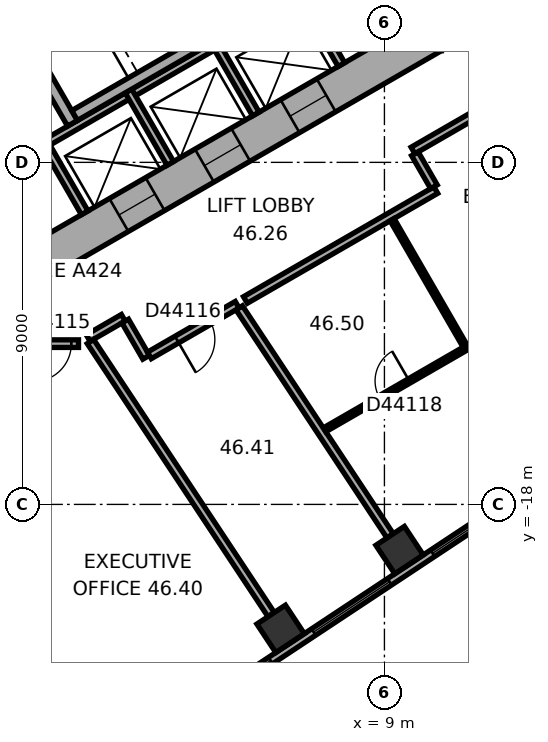
"""IFC4 building model, lengths in metres.
Left out: names, types, materials, properties, quantities, classifications, styles, units other than length and angle.
Written with IfcOpenShell. Run it as: python <this file> out.ifc"""

import sys

from ifc_helpers import new_model, si_unit, direction, frame, frame_2d, origin, origin_2d, place, context, subcontext, project, spatial, rectangle, extrude, element, fill, save


model = new_model("IFC4")
c1 = context("Model", 3, precision=1e-05, world=origin(), true_north=direction((0.0, 1.0)))
c2 = subcontext(c1, "Body", "Model", "MODEL_VIEW")
j1 = project(units=[si_unit("LENGTHUNIT", "METRE"), si_unit("PLANEANGLEUNIT", "RADIAN")], contexts=[c1])
p1 = place(None, origin())
s1 = spatial("IfcSite", under=j1, at=p1, CompositionType="ELEMENT")
p2 = place(p1, origin())
s2 = spatial("IfcBuilding", under=s1, at=p2, CompositionType="ELEMENT")
p3 = place(p2, frame((0.0, 0.0, 187.3)))
s3 = spatial("IfcBuildingStorey", under=s2, at=p3, CompositionType="ELEMENT", Elevation=187.3)
for number, where, z_axis, x_axis in (
    (1, (6.268, -21.274, 0.0), (0.0, 0.0, 1.0), (0.834, 0.552, 0.0)),
    (2, (9.398, -19.202, 0.0), (0.0, 0.0, 1.0), (0.834, 0.552, 0.0)),
):
    element("IfcColumn", number, at=place(p3, frame(where, z_axis=z_axis, x_axis=x_axis)), inside=s3, PredefinedType="COLUMN", context=c2, shape_type="SweptSolid", body=[
        extrude(rectangle(XDim=0.9, YDim=0.9, at=origin_2d()), origin(), (0.0, 0.0, 1.0), 3.7),
    ])
p4 = place(p3, frame((-10.25, -5.629, 0.0), z_axis=(0.0, 0.0, 1.0), x_axis=(0.866022616891, -0.50000482701, 0.0)))
e3 = element("IfcWall", 3, at=p4, inside=s3, PredefinedType="SHEAR", context=c2, shape_type="SweptSolid", body=[
    extrude(rectangle(XDim=12.125, YDim=1.0, at=frame_2d((6.062, 0.0))), origin(), (0.0, 0.0, 1.0), 3.7),
])
p5 = place(p4, frame((6.262, 0.0, 0.0)))
e4 = element("IfcOpeningElement", 4, at=p5, cuts=e3, PredefinedType="OPENING", context=c2, shape_type="SweptSolid", body=[
    extrude(rectangle(XDim=1.5, YDim=2.1, at=frame_2d((0.75, 1.05))), frame((0.0, 0.51, 0.0), z_axis=(0.0, -1.0, 0.0), x_axis=(1.0, 0.0, 0.0)), (0.0, 0.0, 1.0), 1.02),
])
p6 = place(p4, frame((1.712, 0.0, 0.0)))
e5 = element("IfcOpeningElement", 5, at=p6, cuts=e3, PredefinedType="OPENING", context=c2, shape_type="SweptSolid", body=[
    extrude(rectangle(XDim=1.1, YDim=2.1, at=frame_2d((0.55, 1.05))), frame((0.0, 0.51, 0.0), z_axis=(0.0, -1.0, 0.0), x_axis=(1.0, 0.0, 0.0)), (0.0, 0.0, 1.0), 1.02),
])
p7 = place(p4, frame((4.312, 0.0, 0.0)))
e6 = element("IfcOpeningElement", 6, at=p7, cuts=e3, PredefinedType="OPENING", context=c2, shape_type="SweptSolid", body=[
    extrude(rectangle(XDim=1.1, YDim=2.1, at=frame_2d((0.55, 1.05))), frame((0.0, 0.51, 0.0), z_axis=(0.0, -1.0, 0.0), x_axis=(1.0, 0.0, 0.0)), (0.0, 0.0, 1.0), 1.02),
])
p8 = place(p3, frame((-0.25, -11.691, 0.0), z_axis=(0.0, 0.0, 1.0), x_axis=(0.866022616891, 0.50000482701, 0.0)))
e7 = element("IfcWall", 7, at=p8, inside=s3, PredefinedType="SHEAR", context=c2, shape_type="SweptSolid", body=[
    extrude(rectangle(XDim=12.125, YDim=1.0, at=frame_2d((6.062, 0.0))), origin(), (0.0, 0.0, 1.0), 3.7),
])
p9 = place(p8, frame((2.612, 0.0, 0.0)))
e8 = element("IfcOpeningElement", 8, at=p9, cuts=e7, PredefinedType="OPENING", context=c2, shape_type="SweptSolid", body=[
    extrude(rectangle(XDim=1.1, YDim=2.1, at=frame_2d((0.55, 1.05))), frame((0.0, 0.51, 0.0), z_axis=(0.0, -1.0, 0.0), x_axis=(1.0, 0.0, 0.0)), (0.0, 0.0, 1.0), 1.02),
])
p10 = place(p8, frame((5.212, 0.0, 0.0)))
e9 = element("IfcOpeningElement", 9, at=p10, cuts=e7, PredefinedType="OPENING", context=c2, shape_type="SweptSolid", body=[
    extrude(rectangle(XDim=1.1, YDim=2.1, at=frame_2d((0.55, 1.05))), frame((0.0, 0.51, 0.0), z_axis=(0.0, -1.0, 0.0), x_axis=(1.0, 0.0, 0.0)), (0.0, 0.0, 1.0), 1.02),
])
p11 = place(p8, frame((7.812, 0.0, 0.0)))
e10 = element("IfcOpeningElement", 10, at=p11, cuts=e7, PredefinedType="OPENING", context=c2, shape_type="SweptSolid", body=[
    extrude(rectangle(XDim=1.1, YDim=2.1, at=frame_2d((0.55, 1.05))), frame((0.0, 0.51, 0.0), z_axis=(0.0, -1.0, 0.0), x_axis=(1.0, 0.0, 0.0)), (0.0, 0.0, 1.0), 1.02),
])
p12 = place(p3, frame((2.911, -24.156, 0.0), z_axis=(0.0, 0.0, 1.0), x_axis=(0.833882163564, 0.551942512668, 0.0)))
e11 = element("IfcWall", 11, at=p12, inside=s3, PredefinedType="STANDARD", context=c2, shape_type="SweptSolid", body=[
    extrude(rectangle(XDim=20.044, YDim=0.2, at=frame_2d((10.022, 0.0))), origin(), (0.0, 0.0, 1.0), 3.7),
])
p13 = place(p12, frame((1.313, 0.0, 0.9)))
e12 = element("IfcOpeningElement", 12, at=p13, cuts=e11, PredefinedType="OPENING", context=c2, shape_type="SweptSolid", body=[
    extrude(rectangle(XDim=2.4, YDim=2.0, at=frame_2d((1.2, 1.0))), frame((0.0, 0.11, 0.0), z_axis=(0.0, -1.0, 0.0), x_axis=(1.0, 0.0, 0.0)), (0.0, 0.0, 1.0), 0.22),
])
p14 = place(p12, frame((5.067, 0.0, 0.9)))
e13 = element("IfcOpeningElement", 13, at=p14, cuts=e11, PredefinedType="OPENING", context=c2, shape_type="SweptSolid", body=[
    extrude(rectangle(XDim=2.4, YDim=2.0, at=frame_2d((1.2, 1.0))), frame((0.0, 0.11, 0.0), z_axis=(0.0, -1.0, 0.0), x_axis=(1.0, 0.0, 0.0)), (0.0, 0.0, 1.0), 0.22),
])
p15 = place(p12, frame((8.821, 0.0, 0.9)))
e14 = element("IfcOpeningElement", 14, at=p15, cuts=e11, PredefinedType="OPENING", context=c2, shape_type="SweptSolid", body=[
    extrude(rectangle(XDim=2.4, YDim=2.0, at=frame_2d((1.2, 1.0))), frame((0.0, 0.11, 0.0), z_axis=(0.0, -1.0, 0.0), x_axis=(1.0, 0.0, 0.0)), (0.0, 0.0, 1.0), 0.22),
])
p16 = place(p12, frame((12.575, 0.0, 0.9)))
e15 = element("IfcOpeningElement", 15, at=p16, cuts=e11, PredefinedType="OPENING", context=c2, shape_type="SweptSolid", body=[
    extrude(rectangle(XDim=2.4, YDim=2.0, at=frame_2d((1.2, 1.0))), frame((0.0, 0.11, 0.0), z_axis=(0.0, -1.0, 0.0), x_axis=(1.0, 0.0, 0.0)), (0.0, 0.0, 1.0), 0.22),
])
p17 = place(p12, frame((16.329, 0.0, 0.9)))
e16 = element("IfcOpeningElement", 16, at=p17, cuts=e11, PredefinedType="OPENING", context=c2, shape_type="SweptSolid", body=[
    extrude(rectangle(XDim=2.4, YDim=2.0, at=frame_2d((1.2, 1.0))), frame((0.0, 0.11, 0.0), z_axis=(0.0, -1.0, 0.0), x_axis=(1.0, 0.0, 0.0)), (0.0, 0.0, 1.0), 0.22),
])
p18 = place(p3, frame((-0.024, -8.559, 0.0), z_axis=(0.0, 0.0, 1.0), x_axis=(0.866026010844, 0.49999894854, 0.0)))
e17 = element("IfcWall", 17, at=p18, inside=s3, PredefinedType="PARTITIONING", context=c2, shape_type="SweptSolid", body=[
    extrude(rectangle(XDim=8.0, YDim=0.2, at=frame_2d((4.0, 0.0))), origin(), (0.0, 0.0, 1.0), 3.42),
])
for number, where, z_axis, x_axis in (
    (18, (0.013, -8.422, 0.0), (0.0, 0.0, 1.0), (0.5, -0.866, 0.0)),
    (19, (2.264, -7.122, 0.0), (0.0, 0.0, 1.0), (0.5, -0.866, 0.0)),
    (20, (4.516, -5.822, 0.0), (0.0, 0.0, 1.0), (0.5, -0.866, 0.0)),
    (21, (6.768, -4.522, 0.0), (0.0, 0.0, 1.0), (0.5, -0.866, 0.0)),
):
    element("IfcWall", number, at=place(p3, frame(where, z_axis=z_axis, x_axis=x_axis)), inside=s3, PredefinedType="PARTITIONING", context=c2, shape_type="SweptSolid", body=[
        extrude(rectangle(XDim=2.2, YDim=0.2, at=frame_2d((1.1, 0.0))), origin(), (0.0, 0.0, 1.0), 3.42),
    ])
p19 = place(p3, frame((-1.558, -3.902, 0.0), z_axis=(0.0, 0.0, 1.0), x_axis=(0.499977259774, -0.866038532462, 0.0)))
e22 = element("IfcWall", 22, at=p19, inside=s3, PredefinedType="SHEAR", context=c2, shape_type="SweptSolid", body=[
    extrude(rectangle(XDim=4.7, YDim=0.3, at=frame_2d((2.35, 0.0))), origin(), (0.0, 0.0, 1.0), 3.42),
])
p20 = place(p19, frame((0.8, 0.0, 0.0)))
e23 = element("IfcOpeningElement", 23, at=p20, cuts=e22, PredefinedType="OPENING", context=c2, shape_type="SweptSolid", body=[
    extrude(rectangle(XDim=1.2, YDim=2.1, at=frame_2d((0.6, 1.05))), frame((0.0, 0.16, 0.0), z_axis=(0.0, -1.0, 0.0), x_axis=(1.0, 0.0, 0.0)), (0.0, 0.0, 1.0), 0.32),
])
p21 = place(p3, frame((0.847, -7.767, 0.0), z_axis=(0.0, 0.0, 1.0), x_axis=(0.866027801685, 0.499995846692, 0.0)))
e24 = element("IfcWall", 24, at=p21, inside=s3, PredefinedType="SHEAR", context=c2, shape_type="SweptSolid", body=[
    extrude(rectangle(XDim=7.06, YDim=0.3, at=frame_2d((3.53, 0.0))), origin(), (0.0, 0.0, 1.0), 3.42),
])
p22 = place(p3, frame((-0.91, -13.77, 0.0), z_axis=(0.0, 0.0, 1.0), x_axis=(1.0, 0.0, 0.0)))
e25 = element("IfcWall", 25, at=p22, inside=s3, PredefinedType="PARTITIONING", context=c2, shape_type="SweptSolid", body=[
    extrude(rectangle(XDim=1.86, YDim=0.2, at=frame_2d((0.93, 0.0))), origin(), (0.0, 0.0, 1.0), 3.42),
])
p23 = place(p22, frame((0.672, 0.0, 0.0)))
e26 = element("IfcOpeningElement", 26, at=p23, cuts=e25, PredefinedType="OPENING", context=c2, shape_type="SweptSolid", body=[
    extrude(rectangle(XDim=1.0, YDim=2.1, at=frame_2d((0.5, 1.05))), frame((0.0, 0.11, 0.0), z_axis=(0.0, -1.0, 0.0), x_axis=(1.0, 0.0, 0.0)), (0.0, 0.0, 1.0), 0.22),
])
p24 = place(p3, frame((1.204, -13.623, 0.0), z_axis=(0.0, 0.0, 1.0), x_axis=(0.866040989419, 0.499973003918, 0.0)))
e27 = element("IfcWall", 27, at=p24, inside=s3, PredefinedType="PARTITIONING", context=c2, shape_type="SweptSolid", body=[
    extrude(rectangle(XDim=1.068, YDim=0.2, at=frame_2d((0.534, 0.0))), origin(), (0.0, 0.0, 1.0), 3.42),
])
p25 = place(p3, frame((2.179, -13.176, 0.0), z_axis=(0.0, 0.0, 1.0), x_axis=(0.499978356969, -0.866037899034, 0.0)))
e28 = element("IfcWall", 28, at=p25, inside=s3, PredefinedType="PARTITIONING", context=c2, shape_type="SweptSolid", body=[
    extrude(rectangle(XDim=1.101, YDim=0.2, at=frame_2d((0.551, 0.0))), origin(), (0.0, 0.0, 1.0), 3.42),
])
p26 = place(p3, frame((2.816, -14.079, 0.0), z_axis=(0.0, 0.0, 1.0), x_axis=(0.866008705299, 0.50002892151, 0.0)))
e29 = element("IfcWall", 29, at=p26, inside=s3, PredefinedType="PARTITIONING", context=c2, shape_type="SweptSolid", body=[
    extrude(rectangle(XDim=2.666, YDim=0.2, at=frame_2d((1.333, 0.0))), origin(), (0.0, 0.0, 1.0), 3.42),
])
p27 = place(p26, frame((0.833, 0.0, 0.0)))
e30 = element("IfcOpeningElement", 30, at=p27, cuts=e29, PredefinedType="OPENING", context=c2, shape_type="SweptSolid", body=[
    extrude(rectangle(XDim=1.0, YDim=2.1, at=frame_2d((0.5, 1.05))), frame((0.0, 0.11, 0.0), z_axis=(0.0, -1.0, 0.0), x_axis=(1.0, 0.0, 0.0)), (0.0, 0.0, 1.0), 0.22),
])
p28 = place(p3, frame((5.342, -12.621, 0.0), z_axis=(0.0, 0.0, 1.0), x_axis=(0.866024665123, 0.500001279396, 0.0)))
e31 = element("IfcWall", 31, at=p28, inside=s3, PredefinedType="PARTITIONING", context=c2, shape_type="SweptSolid", body=[
    extrude(rectangle(XDim=5.786, YDim=0.2, at=frame_2d((2.893, 0.0))), origin(), (0.0, 0.0, 1.0), 3.42),
])
p29 = place(p3, frame((6.02, -20.899, 0.0), z_axis=(0.0, 0.0, 1.0), x_axis=(-0.551943990108, 0.833881185651, 0.0)))
e32 = element("IfcWall", 32, at=p29, inside=s3, PredefinedType="PARTITIONING", context=c2, shape_type="SweptSolid", body=[
    extrude(rectangle(XDim=8.615, YDim=0.2, at=frame_2d((4.308, 0.0))), origin(), (0.0, 0.0, 1.0), 3.42),
])
p30 = place(p3, frame((9.15, -18.827, 0.0), z_axis=(0.0, 0.0, 1.0), x_axis=(-0.551939801345, 0.833883958169, 0.0)))
e33 = element("IfcWall", 33, at=p30, inside=s3, PredefinedType="PARTITIONING", context=c2, shape_type="SweptSolid", body=[
    extrude(rectangle(XDim=7.192, YDim=0.2, at=frame_2d((3.596, 0.0))), origin(), (0.0, 0.0, 1.0), 2.87),
])
p31 = place(p3, frame((9.202, -10.508, 0.0), z_axis=(0.0, 0.0, 1.0), x_axis=(0.500043961785, -0.866000020948, 0.0)))
e34 = element("IfcWall", 34, at=p31, inside=s3, PredefinedType="PARTITIONING", context=c2, shape_type="SweptSolid", body=[
    extrude(rectangle(XDim=3.9, YDim=0.12, at=frame_2d((1.95, 0.0))), origin(), (0.0, 0.0, 1.0), 3.42),
])
p32 = place(p3, frame((9.752, -8.688, 0.0), z_axis=(0.0, 0.0, 1.0), x_axis=(0.865974105138, 0.500088841337, 0.0)))
e35 = element("IfcWall", 35, at=p32, inside=s3, PredefinedType="PARTITIONING", context=c2, shape_type="SweptSolid", body=[
    extrude(rectangle(XDim=1.961, YDim=0.2, at=frame_2d((0.98, 0.0))), origin(), (0.0, 0.0, 1.0), 3.42),
])
p33 = place(p3, frame((10.302, -9.642, 0.0), z_axis=(0.0, 0.0, 1.0), x_axis=(-0.500074377092, 0.865982457891, 0.0)))
e36 = element("IfcWall", 36, at=p33, inside=s3, PredefinedType="PARTITIONING", context=c2, shape_type="SweptSolid", body=[
    extrude(rectangle(XDim=1.001, YDim=0.2, at=frame_2d((0.5, 0.0))), origin(), (0.0, 0.0, 1.0), 3.42),
])
p34 = place(p3, frame((11.1, -13.915, 0.0), z_axis=(0.0, 0.0, 1.0), x_axis=(-0.866048475386, -0.499960036685, 0.0)))
e37 = element("IfcWall", 37, at=p34, inside=s3, PredefinedType="PARTITIONING", context=c2, shape_type="SweptSolid", body=[
    extrude(rectangle(XDim=4.24, YDim=0.12, at=frame_2d((2.12, 0.0))), origin(), (0.0, 0.0, 1.0), 3.42),
])
p35 = place(p34, frame((1.67, 0.0, 0.0)))
e38 = element("IfcOpeningElement", 38, at=p35, cuts=e37, PredefinedType="OPENING", context=c2, shape_type="SweptSolid", body=[
    extrude(rectangle(XDim=0.9, YDim=2.1, at=frame_2d((0.45, 1.05))), frame((0.0, 0.07, 0.0), z_axis=(0.0, -1.0, 0.0), x_axis=(1.0, 0.0, 0.0)), (0.0, 0.0, 1.0), 0.14),
])
p36 = place(p13, origin())
e39 = element("IfcWindow", 39, at=p36, inside=s3, PartitioningType="SINGLE_PANEL", PredefinedType="WINDOW", context=c2, shape_type="SweptSolid", body=[
    extrude(rectangle(XDim=2.4, YDim=2.0, at=frame_2d((1.2, 1.0))), frame((0.0, 0.03, 0.0), z_axis=(0.0, -1.0, 0.0), x_axis=(1.0, 0.0, 0.0)), (0.0, 0.0, 1.0), 0.06),
])
fill(e12, e39)
p37 = place(p14, origin())
e40 = element("IfcWindow", 40, at=p37, inside=s3, PartitioningType="SINGLE_PANEL", PredefinedType="WINDOW", context=c2, shape_type="SweptSolid", body=[
    extrude(rectangle(XDim=2.4, YDim=2.0, at=frame_2d((1.2, 1.0))), frame((0.0, 0.03, 0.0), z_axis=(0.0, -1.0, 0.0), x_axis=(1.0, 0.0, 0.0)), (0.0, 0.0, 1.0), 0.06),
])
fill(e13, e40)
p38 = place(p15, origin())
e41 = element("IfcWindow", 41, at=p38, inside=s3, PartitioningType="SINGLE_PANEL", PredefinedType="WINDOW", context=c2, shape_type="SweptSolid", body=[
    extrude(rectangle(XDim=2.4, YDim=2.0, at=frame_2d((1.2, 1.0))), frame((0.0, 0.03, 0.0), z_axis=(0.0, -1.0, 0.0), x_axis=(1.0, 0.0, 0.0)), (0.0, 0.0, 1.0), 0.06),
])
fill(e14, e41)
p39 = place(p9, origin())
e42 = element("IfcDoor", 42, at=p39, inside=s3, OperationType="DOUBLE_DOOR_SLIDING", PredefinedType="DOOR", context=c2, shape_type="SweptSolid", body=[
    extrude(rectangle(XDim=1.1, YDim=2.1, at=frame_2d((0.55, 1.05))), frame((0.0, 0.025, 0.0), z_axis=(0.0, -1.0, 0.0), x_axis=(1.0, 0.0, 0.0)), (0.0, 0.0, 1.0), 0.05),
])
fill(e8, e42)
p40 = place(p10, origin())
e43 = element("IfcDoor", 43, at=p40, inside=s3, OperationType="DOUBLE_DOOR_SLIDING", PredefinedType="DOOR", context=c2, shape_type="SweptSolid", body=[
    extrude(rectangle(XDim=1.1, YDim=2.1, at=frame_2d((0.55, 1.05))), frame((0.0, 0.025, 0.0), z_axis=(0.0, -1.0, 0.0), x_axis=(1.0, 0.0, 0.0)), (0.0, 0.0, 1.0), 0.05),
])
fill(e9, e43)
p41 = place(p11, origin())
e44 = element("IfcDoor", 44, at=p41, inside=s3, OperationType="DOUBLE_DOOR_SLIDING", PredefinedType="DOOR", context=c2, shape_type="SweptSolid", body=[
    extrude(rectangle(XDim=1.1, YDim=2.1, at=frame_2d((0.55, 1.05))), frame((0.0, 0.025, 0.0), z_axis=(0.0, -1.0, 0.0), x_axis=(1.0, 0.0, 0.0)), (0.0, 0.0, 1.0), 0.05),
])
fill(e10, e44)
p42 = place(p23, origin())
e45 = element("IfcDoor", 45, at=p42, inside=s3, OperationType="SINGLE_SWING_LEFT", PredefinedType="DOOR", context=c2, shape_type="SweptSolid", body=[
    extrude(rectangle(XDim=1.0, YDim=2.1, at=frame_2d((0.5, 1.05))), frame((0.0, 0.025, 0.0), z_axis=(0.0, -1.0, 0.0), x_axis=(1.0, 0.0, 0.0)), (0.0, 0.0, 1.0), 0.05),
])
fill(e26, e45)
p43 = place(p27, origin())
e46 = element("IfcDoor", 46, at=p43, inside=s3, OperationType="SINGLE_SWING_LEFT", PredefinedType="DOOR", context=c2, shape_type="SweptSolid", body=[
    extrude(rectangle(XDim=1.0, YDim=2.1, at=frame_2d((0.5, 1.05))), frame((0.0, 0.025, 0.0), z_axis=(0.0, -1.0, 0.0), x_axis=(1.0, 0.0, 0.0)), (0.0, 0.0, 1.0), 0.05),
])
fill(e30, e46)
p44 = place(p35, origin())
e47 = element("IfcDoor", 47, at=p44, inside=s3, OperationType="SINGLE_SWING_LEFT", PredefinedType="DOOR", context=c2, shape_type="SweptSolid", body=[
    extrude(rectangle(XDim=0.9, YDim=2.1, at=frame_2d((0.45, 1.05))), frame((0.0, 0.025, 0.0), z_axis=(0.0, -1.0, 0.0), x_axis=(1.0, 0.0, 0.0)), (0.0, 0.0, 1.0), 0.05),
])
fill(e38, e47)
save(model, sys.argv[1])
